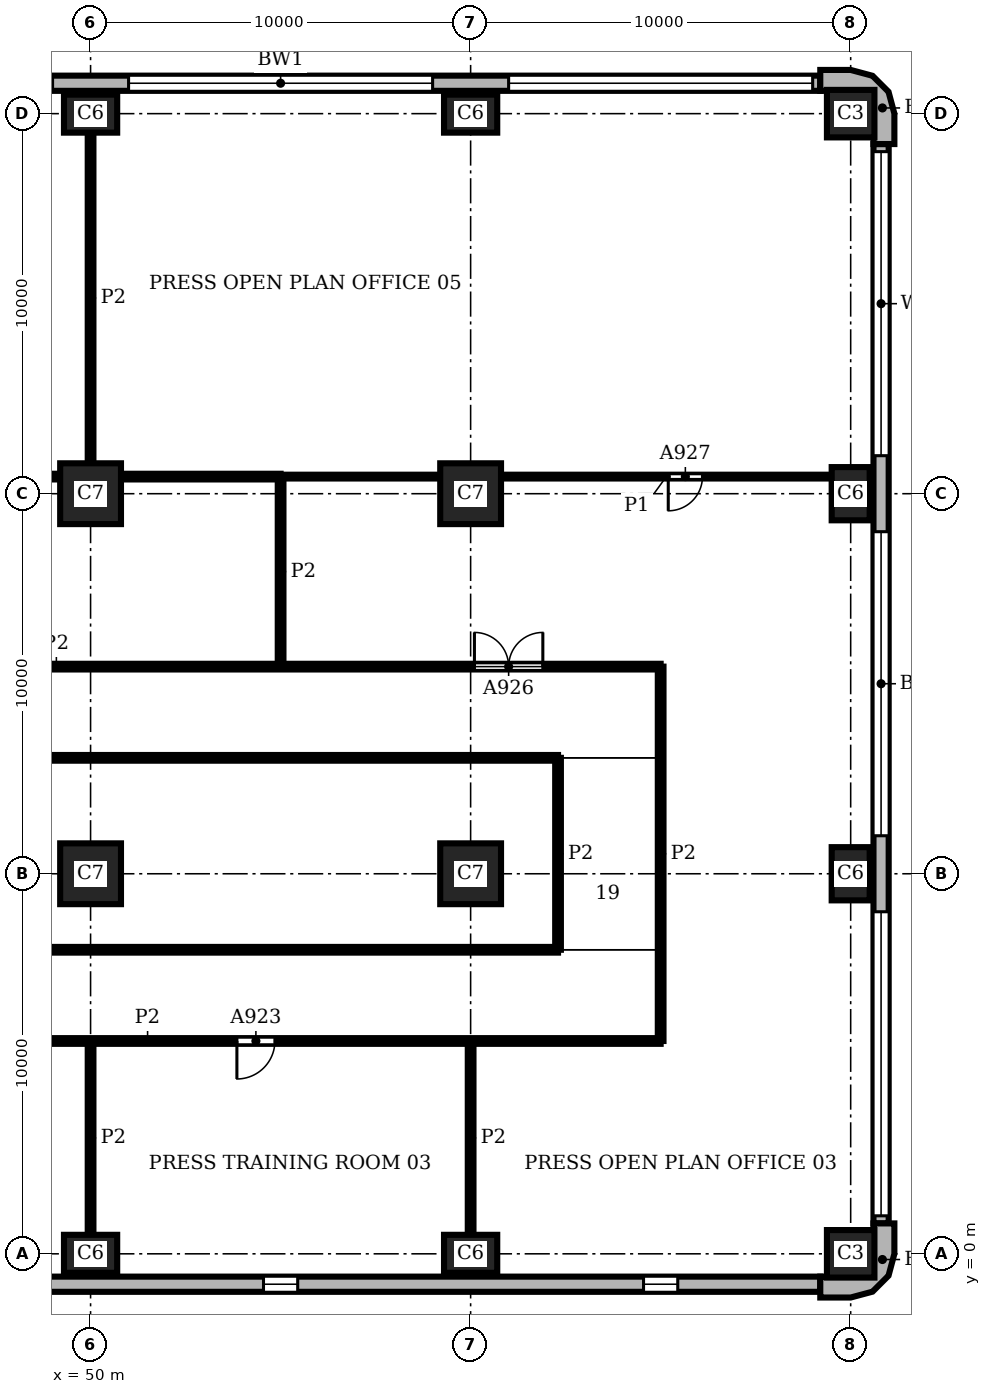
"""IFC4 building model, lengths in metres.
Left out: names, types, materials, properties, quantities, classifications, styles, units other than length and angle.
Written with IfcOpenShell. Run it as: python <this file> out.ifc"""

import sys

from ifc_helpers import new_model, si_unit, direction, frame, frame_2d, origin, origin_2d, place, context, subcontext, project, spatial, polyline, rectangle, outline, extrude, element, fill, save


model = new_model("IFC4")
c1 = context("Model", 3, precision=1e-05, world=origin(), true_north=direction((0.0, 1.0)))
c2 = subcontext(c1, "Body", "Model", "MODEL_VIEW")
j1 = project(units=[si_unit("LENGTHUNIT", "METRE"), si_unit("PLANEANGLEUNIT", "RADIAN")], contexts=[c1])
p1 = place(None, origin())
s1 = spatial("IfcSite", under=j1, at=p1, CompositionType="ELEMENT")
p2 = place(p1, origin())
s2 = spatial("IfcBuilding", under=s1, at=p2, CompositionType="ELEMENT")
p3 = place(p2, frame((0.0, 0.0, 105.6)))
s3 = spatial("IfcBuildingStorey", under=s2, at=p3, CompositionType="ELEMENT", Elevation=105.6)
for number, where, z_axis, x_axis in (
    (1, (50.0, 0.0, 0.0), (0.0, 0.0, 1.0), (1.0, 0.0, 0.0)),
    (2, (60.0, 0.0, 0.0), (0.0, 0.0, 1.0), (1.0, 0.0, 0.0)),
):
    element("IfcColumn", number, at=place(p3, frame(where, z_axis=z_axis, x_axis=x_axis)), inside=s3, PredefinedType="COLUMN", context=c2, shape_type="SweptSolid", body=[
        extrude(rectangle(XDim=1.4, YDim=1.0, at=origin_2d()), origin(), (0.0, 0.0, 1.0), 3.9),
    ])
p4 = place(p3, frame((70.0, 0.0, 0.0), z_axis=(0.0, 0.0, 1.0), x_axis=(1.0, 0.0, 0.0)))
e3 = element("IfcColumn", 3, at=p4, inside=s3, PredefinedType="COLUMN", context=c2, shape_type="SweptSolid", body=[
    extrude(rectangle(XDim=1.25, YDim=1.25, at=origin_2d()), origin(), (0.0, 0.0, 1.0), 3.9),
])
for number, where, z_axis, x_axis in (
    (4, (70.0, 10.0, 0.0), (0.0, 0.0, 1.0), (0.0, 1.0, 0.0)),
    (5, (70.0, 20.0, 0.0), (0.0, 0.0, 1.0), (0.0, 1.0, 0.0)),
):
    element("IfcColumn", number, at=place(p3, frame(where, z_axis=z_axis, x_axis=x_axis)), inside=s3, PredefinedType="COLUMN", context=c2, shape_type="SweptSolid", body=[
        extrude(rectangle(XDim=1.4, YDim=1.0, at=origin_2d()), origin(), (0.0, 0.0, 1.0), 3.9),
    ])
p5 = place(p3, frame((70.0, 30.0, 0.0), z_axis=(0.0, 0.0, 1.0), x_axis=(1.0, 0.0, 0.0)))
e6 = element("IfcColumn", 6, at=p5, inside=s3, PredefinedType="COLUMN", context=c2, shape_type="SweptSolid", body=[
    extrude(rectangle(XDim=1.25, YDim=1.25, at=origin_2d()), origin(), (0.0, 0.0, 1.0), 3.9),
])
for number, where, z_axis, x_axis in (
    (7, (60.0, 30.0, 0.0), (0.0, 0.0, 1.0), (1.0, 0.0, 0.0)),
    (8, (50.0, 30.0, 0.0), (0.0, 0.0, 1.0), (1.0, 0.0, 0.0)),
):
    element("IfcColumn", number, at=place(p3, frame(where, z_axis=z_axis, x_axis=x_axis)), inside=s3, PredefinedType="COLUMN", context=c2, shape_type="SweptSolid", body=[
        extrude(rectangle(XDim=1.4, YDim=1.0, at=origin_2d()), origin(), (0.0, 0.0, 1.0), 3.9),
    ])
for number, where, z_axis, x_axis in (
    (9, (50.0, 10.0, 0.0), (0.0, 0.0, 1.0), (1.0, 0.0, 0.0)),
    (10, (50.0, 20.0, 0.0), (0.0, 0.0, 1.0), (1.0, 0.0, 0.0)),
    (11, (60.0, 10.0, 0.0), (0.0, 0.0, 1.0), (1.0, 0.0, 0.0)),
    (12, (60.0, 20.0, 0.0), (0.0, 0.0, 1.0), (1.0, 0.0, 0.0)),
):
    element("IfcColumn", number, at=place(p3, frame(where, z_axis=z_axis, x_axis=x_axis)), inside=s3, PredefinedType="COLUMN", context=c2, shape_type="SweptSolid", body=[
        extrude(rectangle(XDim=1.6, YDim=1.6, at=origin_2d()), origin(), (0.0, 0.0, 1.0), 3.9),
    ])
p6 = place(p3, origin())
e13 = element("IfcWall", 13, at=p6, inside=s3, PredefinedType="SOLIDWALL", context=c2, shape_type="SweptSolid", body=[
    extrude(outline(polyline([(69.2, -1.0), (69.2, -1.15), (70.0, -1.15), (70.575, -0.996), (70.996, -0.575), (71.15, 0.0), (71.15, 0.8), (71.0, 0.8), (70.6, 0.8), (70.6, 0.0), (70.52, -0.3), (70.3, -0.52), (70.0, -0.6), (69.2, -0.6), (69.2, -1.0)])), origin(), (0.0, 0.0, 1.0), 3.9),
])
e14 = element("IfcWall", 14, at=p6, inside=s3, PredefinedType="SOLIDWALL", context=c2, shape_type="SweptSolid", body=[
    extrude(outline(polyline([(71.0, 29.2), (71.15, 29.2), (71.15, 30.0), (70.996, 30.575), (70.575, 30.996), (70.0, 31.15), (69.2, 31.15), (69.2, 31.0), (69.2, 30.6), (70.0, 30.6), (70.3, 30.52), (70.52, 30.3), (70.6, 30.0), (70.6, 29.2), (71.0, 29.2)])), origin(), (0.0, 0.0, 1.0), 3.9),
])
p7 = place(p3, frame((20.8, -0.8, 0.0), z_axis=(0.0, 0.0, 1.0), x_axis=(1.0, 0.0, 0.0)))
e15 = element("IfcWall", 15, at=p7, inside=s3, PredefinedType="SOLIDWALL", context=c2, shape_type="SweptSolid", body=[
    extrude(rectangle(XDim=48.4, YDim=0.4, at=frame_2d((24.2, 0.0))), origin(), (0.0, 0.0, 1.0), 3.9),
])
p8 = place(p7, frame((3.75, 0.0, 0.9)))
e16 = element("IfcOpeningElement", 16, at=p8, cuts=e15, PredefinedType="OPENING", context=c2, shape_type="SweptSolid", body=[
    extrude(rectangle(XDim=0.9, YDim=2.35, at=frame_2d((0.45, 1.175))), frame((0.0, 0.21, 0.0), z_axis=(0.0, -1.0, 0.0), x_axis=(1.0, 0.0, 0.0)), (0.0, 0.0, 1.0), 0.42),
])
p9 = place(p7, frame((13.75, 0.0, 0.9)))
e17 = element("IfcOpeningElement", 17, at=p9, cuts=e15, PredefinedType="OPENING", context=c2, shape_type="SweptSolid", body=[
    extrude(rectangle(XDim=0.9, YDim=2.35, at=frame_2d((0.45, 1.175))), frame((0.0, 0.21, 0.0), z_axis=(0.0, -1.0, 0.0), x_axis=(1.0, 0.0, 0.0)), (0.0, 0.0, 1.0), 0.42),
])
p10 = place(p7, frame((23.75, 0.0, 0.9)))
e18 = element("IfcOpeningElement", 18, at=p10, cuts=e15, PredefinedType="OPENING", context=c2, shape_type="SweptSolid", body=[
    extrude(rectangle(XDim=0.9, YDim=2.35, at=frame_2d((0.45, 1.175))), frame((0.0, 0.21, 0.0), z_axis=(0.0, -1.0, 0.0), x_axis=(1.0, 0.0, 0.0)), (0.0, 0.0, 1.0), 0.42),
])
p11 = place(p7, frame((33.75, 0.0, 0.9)))
e19 = element("IfcOpeningElement", 19, at=p11, cuts=e15, PredefinedType="OPENING", context=c2, shape_type="SweptSolid", body=[
    extrude(rectangle(XDim=0.9, YDim=2.35, at=frame_2d((0.45, 1.175))), frame((0.0, 0.21, 0.0), z_axis=(0.0, -1.0, 0.0), x_axis=(1.0, 0.0, 0.0)), (0.0, 0.0, 1.0), 0.42),
])
p12 = place(p7, frame((43.75, 0.0, 0.9)))
e20 = element("IfcOpeningElement", 20, at=p12, cuts=e15, PredefinedType="OPENING", context=c2, shape_type="SweptSolid", body=[
    extrude(rectangle(XDim=0.9, YDim=2.35, at=frame_2d((0.45, 1.175))), frame((0.0, 0.21, 0.0), z_axis=(0.0, -1.0, 0.0), x_axis=(1.0, 0.0, 0.0)), (0.0, 0.0, 1.0), 0.42),
])
p13 = place(p3, frame((70.8, 0.8, 0.0), z_axis=(0.0, 0.0, 1.0), x_axis=(0.0, 1.0, 0.0)))
e21 = element("IfcWall", 21, at=p13, inside=s3, PredefinedType="SOLIDWALL", context=c2, shape_type="SweptSolid", body=[
    extrude(rectangle(XDim=28.4, YDim=0.4, at=frame_2d((14.2, 0.0))), origin(), (0.0, 0.0, 1.0), 3.9),
])
p14 = place(p13, frame((0.2, 0.0, 0.9)))
e22 = element("IfcOpeningElement", 22, at=p14, cuts=e21, PredefinedType="OPENING", context=c2, shape_type="SweptSolid", body=[
    extrude(rectangle(XDim=8.0, YDim=2.35, at=frame_2d((4.0, 1.175))), frame((0.0, 0.21, 0.0), z_axis=(0.0, -1.0, 0.0), x_axis=(1.0, 0.0, 0.0)), (0.0, 0.0, 1.0), 0.42),
])
p15 = place(p13, frame((10.2, 0.0, 0.9)))
e23 = element("IfcOpeningElement", 23, at=p15, cuts=e21, PredefinedType="OPENING", context=c2, shape_type="SweptSolid", body=[
    extrude(rectangle(XDim=8.0, YDim=2.35, at=frame_2d((4.0, 1.175))), frame((0.0, 0.21, 0.0), z_axis=(0.0, -1.0, 0.0), x_axis=(1.0, 0.0, 0.0)), (0.0, 0.0, 1.0), 0.42),
])
p16 = place(p13, frame((20.2, 0.0, 0.9)))
e24 = element("IfcOpeningElement", 24, at=p16, cuts=e21, PredefinedType="OPENING", context=c2, shape_type="SweptSolid", body=[
    extrude(rectangle(XDim=8.0, YDim=2.35, at=frame_2d((4.0, 1.175))), frame((0.0, 0.21, 0.0), z_axis=(0.0, -1.0, 0.0), x_axis=(1.0, 0.0, 0.0)), (0.0, 0.0, 1.0), 0.42),
])
p17 = place(p3, frame((69.2, 30.8, 0.0), z_axis=(0.0, 0.0, 1.0), x_axis=(-1.0, 0.0, 0.0)))
e25 = element("IfcWall", 25, at=p17, inside=s3, PredefinedType="SOLIDWALL", context=c2, shape_type="SweptSolid", body=[
    extrude(rectangle(XDim=28.4, YDim=0.4, at=frame_2d((14.2, 0.0))), origin(), (0.0, 0.0, 1.0), 3.9),
])
p18 = place(p17, frame((0.2, 0.0, 0.9)))
e26 = element("IfcOpeningElement", 26, at=p18, cuts=e25, PredefinedType="OPENING", context=c2, shape_type="SweptSolid", body=[
    extrude(rectangle(XDim=8.0, YDim=2.35, at=frame_2d((4.0, 1.175))), frame((0.0, 0.21, 0.0), z_axis=(0.0, -1.0, 0.0), x_axis=(1.0, 0.0, 0.0)), (0.0, 0.0, 1.0), 0.42),
])
p19 = place(p17, frame((10.2, 0.0, 0.9)))
e27 = element("IfcOpeningElement", 27, at=p19, cuts=e25, PredefinedType="OPENING", context=c2, shape_type="SweptSolid", body=[
    extrude(rectangle(XDim=8.0, YDim=2.35, at=frame_2d((4.0, 1.175))), frame((0.0, 0.21, 0.0), z_axis=(0.0, -1.0, 0.0), x_axis=(1.0, 0.0, 0.0)), (0.0, 0.0, 1.0), 0.42),
])
p20 = place(p17, frame((20.2, 0.0, 0.9)))
e28 = element("IfcOpeningElement", 28, at=p20, cuts=e25, PredefinedType="OPENING", context=c2, shape_type="SweptSolid", body=[
    extrude(rectangle(XDim=8.0, YDim=2.35, at=frame_2d((4.0, 1.175))), frame((0.0, 0.21, 0.0), z_axis=(0.0, -1.0, 0.0), x_axis=(1.0, 0.0, 0.0)), (0.0, 0.0, 1.0), 0.42),
])
p21 = place(p3, frame((55.0, 20.45, 0.0), z_axis=(0.0, 0.0, 1.0), x_axis=(1.0, 0.0, 0.0)))
e29 = element("IfcWall", 29, at=p21, inside=s3, PredefinedType="PARTITIONING", context=c2, shape_type="SweptSolid", body=[
    extrude(rectangle(XDim=4.2, YDim=0.1, at=frame_2d((2.1, 0.0))), origin(), (0.0, 0.0, 1.0), 3.58),
])
p22 = place(p3, frame((60.8, 20.45, 0.0), z_axis=(0.0, 0.0, 1.0), x_axis=(1.0, 0.0, 0.0)))
e30 = element("IfcWall", 30, at=p22, inside=s3, PredefinedType="PARTITIONING", context=c2, shape_type="SweptSolid", body=[
    extrude(rectangle(XDim=8.7, YDim=0.1, at=frame_2d((4.35, 0.0))), origin(), (0.0, 0.0, 1.0), 3.58),
])
p23 = place(p22, frame((4.4, 0.0, 0.0)))
e31 = element("IfcOpeningElement", 31, at=p23, cuts=e30, PredefinedType="OPENING", context=c2, shape_type="SweptSolid", body=[
    extrude(rectangle(XDim=0.9, YDim=2.1, at=frame_2d((0.45, 1.05))), frame((0.0, 0.06, 0.0), z_axis=(0.0, -1.0, 0.0), x_axis=(1.0, 0.0, 0.0)), (0.0, 0.0, 1.0), 0.12),
])
p24 = place(p3, frame((50.0, 0.5, 0.0), z_axis=(0.0, 0.0, 1.0), x_axis=(0.0, 1.0, 0.0)))
e32 = element("IfcWall", 32, at=p24, inside=s3, PredefinedType="PARTITIONING", context=c2, shape_type="SweptSolid", body=[
    extrude(rectangle(XDim=5.1, YDim=0.15, at=frame_2d((2.55, 0.0))), origin(), (0.0, 0.0, 1.0), 3.58),
])
p25 = place(p3, frame((50.0, 20.8, 0.0), z_axis=(0.0, 0.0, 1.0), x_axis=(0.0, 1.0, 0.0)))
e33 = element("IfcWall", 33, at=p25, inside=s3, PredefinedType="PARTITIONING", context=c2, shape_type="SweptSolid", body=[
    extrude(rectangle(XDim=8.7, YDim=0.15, at=frame_2d((4.35, 0.0))), origin(), (0.0, 0.0, 1.0), 3.58),
])
p26 = place(p3, frame((55.0, 15.45, 0.0), z_axis=(0.0, 0.0, 1.0), x_axis=(0.0, 1.0, 0.0)))
e34 = element("IfcWall", 34, at=p26, inside=s3, PredefinedType="PARTITIONING", context=c2, shape_type="SweptSolid", body=[
    extrude(rectangle(XDim=5.0, YDim=0.15, at=frame_2d((2.5, 0.0))), origin(), (0.0, 0.0, 1.0), 3.58),
])
p27 = place(p3, frame((60.0, 0.5, 0.0), z_axis=(0.0, 0.0, 1.0), x_axis=(0.0, 1.0, 0.0)))
e35 = element("IfcWall", 35, at=p27, inside=s3, PredefinedType="PARTITIONING", context=c2, shape_type="SweptSolid", body=[
    extrude(rectangle(XDim=5.1, YDim=0.15, at=frame_2d((2.55, 0.0))), origin(), (0.0, 0.0, 1.0), 3.58),
])
p28 = place(p3, frame((62.3, 8.0, 0.0), z_axis=(0.0, 0.0, 1.0), x_axis=(0.0, 1.0, 0.0)))
e36 = element("IfcWall", 36, at=p28, inside=s3, PredefinedType="PARTITIONING", context=c2, shape_type="SweptSolid", body=[
    extrude(rectangle(XDim=5.05, YDim=0.15, at=frame_2d((2.525, 0.0))), origin(), (0.0, 0.0, 1.0), 3.58),
])
p29 = place(p3, frame((65.0, 5.6, 0.0), z_axis=(0.0, 0.0, 1.0), x_axis=(0.0, 1.0, 0.0)))
e37 = element("IfcWall", 37, at=p29, inside=s3, PredefinedType="PARTITIONING", context=c2, shape_type="SweptSolid", body=[
    extrude(rectangle(XDim=9.85, YDim=0.15, at=frame_2d((4.925, 0.0))), origin(), (0.0, 0.0, 1.0), 3.58),
])
p30 = place(p3, frame((38.0, 5.6, 0.0), z_axis=(0.0, 0.0, 1.0), x_axis=(1.0, 0.0, 0.0)))
e38 = element("IfcWall", 38, at=p30, inside=s3, PredefinedType="PARTITIONING", context=c2, shape_type="SweptSolid", body=[
    extrude(rectangle(XDim=27.0, YDim=0.15, at=frame_2d((13.5, 0.0))), origin(), (0.0, 0.0, 1.0), 3.58),
])
p31 = place(p30, frame((0.6, 0.0, 0.0)))
e39 = element("IfcOpeningElement", 39, at=p31, cuts=e38, PredefinedType="OPENING", context=c2, shape_type="SweptSolid", body=[
    extrude(rectangle(XDim=1.0, YDim=2.1, at=frame_2d((0.5, 1.05))), frame((0.0, 0.085, 0.0), z_axis=(0.0, -1.0, 0.0), x_axis=(1.0, 0.0, 0.0)), (0.0, 0.0, 1.0), 0.17),
])
p32 = place(p30, frame((6.1, 0.0, 0.0)))
e40 = element("IfcOpeningElement", 40, at=p32, cuts=e38, PredefinedType="OPENING", context=c2, shape_type="SweptSolid", body=[
    extrude(rectangle(XDim=1.0, YDim=2.1, at=frame_2d((0.5, 1.05))), frame((0.0, 0.085, 0.0), z_axis=(0.0, -1.0, 0.0), x_axis=(1.0, 0.0, 0.0)), (0.0, 0.0, 1.0), 0.17),
])
p33 = place(p30, frame((15.85, 0.0, 0.0)))
e41 = element("IfcOpeningElement", 41, at=p33, cuts=e38, PredefinedType="OPENING", context=c2, shape_type="SweptSolid", body=[
    extrude(rectangle(XDim=1.0, YDim=2.1, at=frame_2d((0.5, 1.05))), frame((0.0, 0.085, 0.0), z_axis=(0.0, -1.0, 0.0), x_axis=(1.0, 0.0, 0.0)), (0.0, 0.0, 1.0), 0.17),
])
p34 = place(p3, frame((33.2, 8.0, 0.0), z_axis=(0.0, 0.0, 1.0), x_axis=(1.0, 0.0, 0.0)))
e42 = element("IfcWall", 42, at=p34, inside=s3, PredefinedType="PARTITIONING", context=c2, shape_type="SweptSolid", body=[
    extrude(rectangle(XDim=29.1, YDim=0.15, at=frame_2d((14.55, 0.0))), origin(), (0.0, 0.0, 1.0), 3.58),
])
p35 = place(p3, frame((33.2, 13.05, 0.0), z_axis=(0.0, 0.0, 1.0), x_axis=(1.0, 0.0, 0.0)))
e43 = element("IfcWall", 43, at=p35, inside=s3, PredefinedType="PARTITIONING", context=c2, shape_type="SweptSolid", body=[
    extrude(rectangle(XDim=29.1, YDim=0.15, at=frame_2d((14.55, 0.0))), origin(), (0.0, 0.0, 1.0), 3.58),
])
p36 = place(p35, frame((14.1, 0.0, 0.0)))
e44 = element("IfcOpeningElement", 44, at=p36, cuts=e43, PredefinedType="OPENING", context=c2, shape_type="SweptSolid", body=[
    extrude(rectangle(XDim=1.0, YDim=2.1, at=frame_2d((0.5, 1.05))), frame((0.0, 0.085, 0.0), z_axis=(0.0, -1.0, 0.0), x_axis=(1.0, 0.0, 0.0)), (0.0, 0.0, 1.0), 0.17),
])
p37 = place(p3, frame((33.2, 15.45, 0.0), z_axis=(0.0, 0.0, 1.0), x_axis=(1.0, 0.0, 0.0)))
e45 = element("IfcWall", 45, at=p37, inside=s3, PredefinedType="PARTITIONING", context=c2, shape_type="SweptSolid", body=[
    extrude(rectangle(XDim=31.8, YDim=0.15, at=frame_2d((15.9, 0.0))), origin(), (0.0, 0.0, 1.0), 3.58),
])
p38 = place(p37, frame((11.85, 0.0, 0.0)))
e46 = element("IfcOpeningElement", 46, at=p38, cuts=e45, PredefinedType="OPENING", context=c2, shape_type="SweptSolid", body=[
    extrude(rectangle(XDim=1.0, YDim=2.1, at=frame_2d((0.5, 1.05))), frame((0.0, 0.085, 0.0), z_axis=(0.0, -1.0, 0.0), x_axis=(1.0, 0.0, 0.0)), (0.0, 0.0, 1.0), 0.17),
])
p39 = place(p37, frame((26.9, 0.0, 0.0)))
e47 = element("IfcOpeningElement", 47, at=p39, cuts=e45, PredefinedType="OPENING", context=c2, shape_type="SweptSolid", body=[
    extrude(rectangle(XDim=1.8, YDim=2.1, at=frame_2d((0.9, 1.05))), frame((0.0, 0.085, 0.0), z_axis=(0.0, -1.0, 0.0), x_axis=(1.0, 0.0, 0.0)), (0.0, 0.0, 1.0), 0.17),
])
p40 = place(p3, frame((40.8, 20.45, 0.0), z_axis=(0.0, 0.0, 1.0), x_axis=(1.0, 0.0, 0.0)))
e48 = element("IfcWall", 48, at=p40, inside=s3, PredefinedType="PARTITIONING", context=c2, shape_type="SweptSolid", body=[
    extrude(rectangle(XDim=8.4, YDim=0.15, at=frame_2d((4.2, 0.0))), origin(), (0.0, 0.0, 1.0), 3.58),
])
p41 = place(p3, frame((50.8, 20.45, 0.0), z_axis=(0.0, 0.0, 1.0), x_axis=(1.0, 0.0, 0.0)))
e49 = element("IfcWall", 49, at=p41, inside=s3, PredefinedType="PARTITIONING", context=c2, shape_type="SweptSolid", body=[
    extrude(rectangle(XDim=4.2, YDim=0.15, at=frame_2d((2.1, 0.0))), origin(), (0.0, 0.0, 1.0), 3.58),
])
p42 = place(p11, origin())
e50 = element("IfcWindow", 50, at=p42, inside=s3, PartitioningType="SINGLE_PANEL", PredefinedType="WINDOW", context=c2, shape_type="SweptSolid", body=[
    extrude(rectangle(XDim=0.9, YDim=2.35, at=frame_2d((0.45, 1.175))), frame((0.0, 0.16, 0.0), z_axis=(0.0, -1.0, 0.0), x_axis=(1.0, 0.0, 0.0)), (0.0, 0.0, 1.0), 0.06),
])
fill(e19, e50)
p43 = place(p12, origin())
e51 = element("IfcWindow", 51, at=p43, inside=s3, PartitioningType="SINGLE_PANEL", PredefinedType="WINDOW", context=c2, shape_type="SweptSolid", body=[
    extrude(rectangle(XDim=0.9, YDim=2.35, at=frame_2d((0.45, 1.175))), frame((0.0, 0.16, 0.0), z_axis=(0.0, -1.0, 0.0), x_axis=(1.0, 0.0, 0.0)), (0.0, 0.0, 1.0), 0.06),
])
fill(e20, e51)
p44 = place(p14, origin())
e52 = element("IfcWindow", 52, at=p44, inside=s3, PartitioningType="SINGLE_PANEL", PredefinedType="WINDOW", context=c2, shape_type="SweptSolid", body=[
    extrude(rectangle(XDim=8.0, YDim=2.35, at=frame_2d((4.0, 1.175))), frame((0.0, 0.16, 0.0), z_axis=(0.0, -1.0, 0.0), x_axis=(1.0, 0.0, 0.0)), (0.0, 0.0, 1.0), 0.06),
])
fill(e22, e52)
p45 = place(p15, origin())
e53 = element("IfcWindow", 53, at=p45, inside=s3, PartitioningType="SINGLE_PANEL", PredefinedType="WINDOW", context=c2, shape_type="SweptSolid", body=[
    extrude(rectangle(XDim=8.0, YDim=2.35, at=frame_2d((4.0, 1.175))), frame((0.0, 0.16, 0.0), z_axis=(0.0, -1.0, 0.0), x_axis=(1.0, 0.0, 0.0)), (0.0, 0.0, 1.0), 0.06),
])
fill(e23, e53)
p46 = place(p16, origin())
e54 = element("IfcWindow", 54, at=p46, inside=s3, PartitioningType="SINGLE_PANEL", PredefinedType="WINDOW", context=c2, shape_type="SweptSolid", body=[
    extrude(rectangle(XDim=8.0, YDim=2.35, at=frame_2d((4.0, 1.175))), frame((0.0, 0.16, 0.0), z_axis=(0.0, -1.0, 0.0), x_axis=(1.0, 0.0, 0.0)), (0.0, 0.0, 1.0), 0.06),
])
fill(e24, e54)
p47 = place(p18, origin())
e55 = element("IfcWindow", 55, at=p47, inside=s3, PartitioningType="SINGLE_PANEL", PredefinedType="WINDOW", context=c2, shape_type="SweptSolid", body=[
    extrude(rectangle(XDim=8.0, YDim=2.35, at=frame_2d((4.0, 1.175))), frame((0.0, 0.16, 0.0), z_axis=(0.0, -1.0, 0.0), x_axis=(1.0, 0.0, 0.0)), (0.0, 0.0, 1.0), 0.06),
])
fill(e26, e55)
p48 = place(p19, origin())
e56 = element("IfcWindow", 56, at=p48, inside=s3, PartitioningType="SINGLE_PANEL", PredefinedType="WINDOW", context=c2, shape_type="SweptSolid", body=[
    extrude(rectangle(XDim=8.0, YDim=2.35, at=frame_2d((4.0, 1.175))), frame((0.0, 0.16, 0.0), z_axis=(0.0, -1.0, 0.0), x_axis=(1.0, 0.0, 0.0)), (0.0, 0.0, 1.0), 0.06),
])
fill(e27, e56)
p49 = place(p33, frame((1.0, 0.0, 0.0), z_axis=(0.0, 0.0, 1.0), x_axis=(-1.0, 0.0, 0.0)))
e57 = element("IfcDoor", 57, at=p49, inside=s3, OperationType="SINGLE_SWING_RIGHT", PredefinedType="DOOR", context=c2, shape_type="SweptSolid", body=[
    extrude(rectangle(XDim=1.0, YDim=2.1, at=frame_2d((0.5, 1.05))), frame((0.0, 0.025, 0.0), z_axis=(0.0, -1.0, 0.0), x_axis=(1.0, 0.0, 0.0)), (0.0, 0.0, 1.0), 0.05),
])
fill(e41, e57)
p50 = place(p39, origin())
e58 = element("IfcDoor", 58, at=p50, inside=s3, OperationType="DOUBLE_DOOR_SINGLE_SWING", PredefinedType="DOOR", context=c2, shape_type="SweptSolid", body=[
    extrude(rectangle(XDim=1.8, YDim=2.1, at=frame_2d((0.9, 1.05))), frame((0.0, 0.025, 0.0), z_axis=(0.0, -1.0, 0.0), x_axis=(1.0, 0.0, 0.0)), (0.0, 0.0, 1.0), 0.05),
])
fill(e47, e58)
p51 = place(p23, frame((0.9, 0.0, 0.0), z_axis=(0.0, 0.0, 1.0), x_axis=(-1.0, 0.0, 0.0)))
e59 = element("IfcDoor", 59, at=p51, inside=s3, OperationType="SINGLE_SWING_RIGHT", PredefinedType="DOOR", context=c2, shape_type="SweptSolid", body=[
    extrude(rectangle(XDim=0.9, YDim=2.1, at=frame_2d((0.45, 1.05))), frame((0.0, 0.025, 0.0), z_axis=(0.0, -1.0, 0.0), x_axis=(1.0, 0.0, 0.0)), (0.0, 0.0, 1.0), 0.05),
])
fill(e31, e59)
save(model, sys.argv[1])
